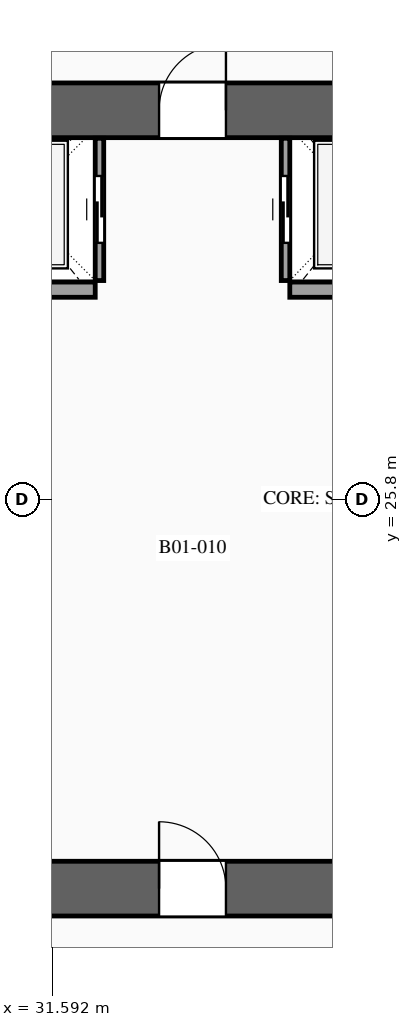
"""IFC4 building model, lengths in metres.
Left out: names, types, materials, properties, quantities, classifications, styles, units other than length and angle.
Written with IfcOpenShell. Run it as: python <this file> out.ifc"""

import sys

from ifc_helpers import new_model, si_unit, direction, frame, frame_2d, origin, place, context, subcontext, project, spatial, rectangle, extrude, source, transform, mapped, element, fill, save


model = new_model("IFC4")
c1 = context("Model", 3, precision=1e-05, world=origin(), true_north=direction((0.0, 1.0)))
c2 = subcontext(c1, "Body", "Model", "MODEL_VIEW")
j1 = project(units=[si_unit("LENGTHUNIT", "METRE"), si_unit("PLANEANGLEUNIT", "RADIAN")], contexts=[c1])
p1 = place(None, origin())
s1 = spatial("IfcSite", under=j1, at=p1, CompositionType="ELEMENT")
p2 = place(p1, origin())
s2 = spatial("IfcBuilding", under=s1, at=p2, CompositionType="ELEMENT")
p3 = place(p2, frame((0.0, 0.0, -4.5)))
s3 = spatial("IfcBuildingStorey", under=s2, at=p3, CompositionType="ELEMENT", Elevation=-4.5)
p4 = place(p3, frame((23.35, 19.4, 0.0), z_axis=(0.0, 0.0, 1.0), x_axis=(1.0, 0.0, 0.0)))
e1 = element("IfcWall", 1, at=p4, inside=s3, PredefinedType="SHEAR", context=c2, shape_type="SweptSolid", body=[
    extrude(rectangle(XDim=27.3, YDim=0.9, at=frame_2d((13.65, 0.0))), origin(), (0.0, 0.0, 1.0), 4.5),
])
p5 = place(p4, frame((2.1, 0.0, 0.0)))
e2 = element("IfcOpeningElement", 2, at=p5, cuts=e1, PredefinedType="OPENING", context=c2, shape_type="SweptSolid", body=[
    extrude(rectangle(XDim=1.1, YDim=2.2, at=frame_2d((0.55, 1.1))), frame((0.0, 0.465, 0.0), z_axis=(0.0, -1.0, 0.0), x_axis=(1.0, 0.0, 0.0)), (0.0, 0.0, 1.0), 0.93),
])
p6 = place(p4, frame((10.0, 0.0, 0.0)))
e3 = element("IfcOpeningElement", 3, at=p6, cuts=e1, PredefinedType="OPENING", context=c2, shape_type="SweptSolid", body=[
    extrude(rectangle(XDim=1.1, YDim=2.2, at=frame_2d((0.55, 1.1))), frame((0.0, 0.465, 0.0), z_axis=(0.0, -1.0, 0.0), x_axis=(1.0, 0.0, 0.0)), (0.0, 0.0, 1.0), 0.93),
])
p7 = place(p4, frame((23.2, 0.0, 0.0)))
e4 = element("IfcOpeningElement", 4, at=p7, cuts=e1, PredefinedType="OPENING", context=c2, shape_type="SweptSolid", body=[
    extrude(rectangle(XDim=1.1, YDim=2.2, at=frame_2d((0.55, 1.1))), frame((0.0, 0.465, 0.0), z_axis=(0.0, -1.0, 0.0), x_axis=(1.0, 0.0, 0.0)), (0.0, 0.0, 1.0), 0.93),
])
p8 = place(p4, frame((19.82, 0.0, 0.0)))
e5 = element("IfcOpeningElement", 5, at=p8, cuts=e1, PredefinedType="OPENING", context=c2, shape_type="SweptSolid", body=[
    extrude(rectangle(XDim=0.9, YDim=2.15, at=frame_2d((0.45, 1.075))), frame((0.0, 0.465, 0.0), z_axis=(0.0, -1.0, 0.0), x_axis=(1.0, 0.0, 0.0)), (0.0, 0.0, 1.0), 0.93),
])
p9 = place(p4, frame((18.38, 0.0, 0.0)))
e6 = element("IfcOpeningElement", 6, at=p9, cuts=e1, PredefinedType="OPENING", context=c2, shape_type="SweptSolid", body=[
    extrude(rectangle(XDim=0.9, YDim=2.15, at=frame_2d((0.45, 1.075))), frame((0.0, 0.465, 0.0), z_axis=(0.0, -1.0, 0.0), x_axis=(1.0, 0.0, 0.0)), (0.0, 0.0, 1.0), 0.93),
])
p10 = place(p3, frame((23.35, 32.2, 0.0), z_axis=(0.0, 0.0, 1.0), x_axis=(1.0, 0.0, 0.0)))
e7 = element("IfcWall", 7, at=p10, inside=s3, PredefinedType="SHEAR", context=c2, shape_type="SweptSolid", body=[
    extrude(rectangle(XDim=27.3, YDim=0.9, at=frame_2d((13.65, 0.0))), origin(), (0.0, 0.0, 1.0), 4.5),
])
p11 = place(p10, frame((4.72, 0.0, 0.0)))
e8 = element("IfcOpeningElement", 8, at=p11, cuts=e7, PredefinedType="OPENING", context=c2, shape_type="SweptSolid", body=[
    extrude(rectangle(XDim=0.9, YDim=2.15, at=frame_2d((0.45, 1.075))), frame((0.0, 0.465, 0.0), z_axis=(0.0, -1.0, 0.0), x_axis=(1.0, 0.0, 0.0)), (0.0, 0.0, 1.0), 0.93),
])
p12 = place(p10, frame((10.0, 0.0, 0.0)))
e9 = element("IfcOpeningElement", 9, at=p12, cuts=e7, PredefinedType="OPENING", context=c2, shape_type="SweptSolid", body=[
    extrude(rectangle(XDim=1.1, YDim=2.2, at=frame_2d((0.55, 1.1))), frame((0.0, 0.465, 0.0), z_axis=(0.0, -1.0, 0.0), x_axis=(1.0, 0.0, 0.0)), (0.0, 0.0, 1.0), 0.93),
])
p13 = place(p10, frame((15.85, 0.0, 0.0)))
e10 = element("IfcOpeningElement", 10, at=p13, cuts=e7, PredefinedType="OPENING", context=c2, shape_type="SweptSolid", body=[
    extrude(rectangle(XDim=1.1, YDim=2.2, at=frame_2d((0.55, 1.1))), frame((0.0, 0.465, 0.0), z_axis=(0.0, -1.0, 0.0), x_axis=(1.0, 0.0, 0.0)), (0.0, 0.0, 1.0), 0.93),
])
p14 = place(p10, frame((19.05, 0.0, 0.0)))
e11 = element("IfcOpeningElement", 11, at=p14, cuts=e7, PredefinedType="OPENING", context=c2, shape_type="SweptSolid", body=[
    extrude(rectangle(XDim=0.9, YDim=2.15, at=frame_2d((0.45, 1.075))), frame((0.0, 0.465, 0.0), z_axis=(0.0, -1.0, 0.0), x_axis=(1.0, 0.0, 0.0)), (0.0, 0.0, 1.0), 0.93),
])
p15 = place(p3, frame((32.37, 29.4, 0.0), z_axis=(0.0, 0.0, 1.0), x_axis=(0.0, 1.0, 0.0)))
e12 = element("IfcWall", 12, at=p15, inside=s3, PredefinedType="SOLIDWALL", context=c2, shape_type="SweptSolid", body=[
    extrude(rectangle(XDim=2.34, YDim=0.14, at=frame_2d((1.17, 0.0))), origin(), (0.0, 0.0, 1.0), 4.2),
])
p16 = place(p15, frame((0.62, 0.0, 0.0)))
e13 = element("IfcOpeningElement", 13, at=p16, cuts=e12, PredefinedType="OPENING", context=c2, shape_type="SweptSolid", body=[
    extrude(rectangle(XDim=1.1, YDim=2.2, at=frame_2d((0.55, 1.1))), frame((0.0, 0.085, 0.0), z_axis=(0.0, -1.0, 0.0), x_axis=(1.0, 0.0, 0.0)), (0.0, 0.0, 1.0), 0.17),
])
m1 = source(origin(), c2, "Body", "SweptSolid", [
    extrude(rectangle(XDim=2.5, YDim=0.25, at=frame_2d((1.25, 0.0))), origin(), (0.0, 0.0, 1.0), 4.2),
])
p17 = place(p3, frame((29.8, 29.25, 0.0), z_axis=(0.0, 0.0, 1.0), x_axis=(1.0, 0.0, 0.0)))
e14 = element("IfcWall", 14, at=p17, inside=s3, PredefinedType="SOLIDWALL", context=c2, shape_type="MappedRepresentation", body=[
    mapped(m1, transform((0.0, 0.0, 0.0), scale=1.0)),
])
p18 = place(p3, frame((35.43, 29.4, 0.0), z_axis=(0.0, 0.0, 1.0), x_axis=(0.0, 1.0, 0.0)))
e15 = element("IfcWall", 15, at=p18, inside=s3, PredefinedType="SOLIDWALL", context=c2, shape_type="SweptSolid", body=[
    extrude(rectangle(XDim=2.34, YDim=0.14, at=frame_2d((1.17, 0.0))), origin(), (0.0, 0.0, 1.0), 4.2),
])
p19 = place(p18, frame((0.62, 0.0, 0.0)))
e16 = element("IfcOpeningElement", 16, at=p19, cuts=e15, PredefinedType="OPENING", context=c2, shape_type="SweptSolid", body=[
    extrude(rectangle(XDim=1.1, YDim=2.2, at=frame_2d((0.55, 1.1))), frame((0.0, 0.085, 0.0), z_axis=(0.0, -1.0, 0.0), x_axis=(1.0, 0.0, 0.0)), (0.0, 0.0, 1.0), 0.17),
])
m2 = source(origin(), c2, "Body", "SweptSolid", [
    extrude(rectangle(XDim=2.4, YDim=0.25, at=frame_2d((1.2, 0.0))), origin(), (0.0, 0.0, 1.0), 4.2),
])
p20 = place(p3, frame((35.5, 29.25, 0.0), z_axis=(0.0, 0.0, 1.0), x_axis=(1.0, 0.0, 0.0)))
e17 = element("IfcWall", 17, at=p20, inside=s3, PredefinedType="SOLIDWALL", context=c2, shape_type="MappedRepresentation", body=[
    mapped(m2, transform((0.0, 0.0, 0.0), scale=1.0)),
])
m3 = source(origin(), c2, "Body", "SweptSolid", [
    extrude(rectangle(XDim=1.1, YDim=2.2, at=frame_2d((0.55, 1.1))), frame((0.0, 0.025, 0.0), z_axis=(0.0, -1.0, 0.0), x_axis=(1.0, 0.0, 0.0)), (0.0, 0.0, 1.0), 0.05),
])
p21 = place(p16, origin())
e18 = element("IfcDoor", 18, at=p21, inside=s3, OperationType="SLIDING_TO_LEFT", PredefinedType="DOOR", context=c2, shape_type="MappedRepresentation", body=[
    mapped(m3, transform((0.0, 0.0, 0.0), scale=1.0)),
])
fill(e13, e18)
p22 = place(p19, origin())
e19 = element("IfcDoor", 19, at=p22, inside=s3, OperationType="SLIDING_TO_RIGHT", PredefinedType="DOOR", context=c2, shape_type="MappedRepresentation", body=[
    mapped(m3, transform((0.0, 0.0, 0.0), scale=1.0)),
])
fill(e16, e19)
m4 = source(origin(), c2, "Body", "SweptSolid", [
    extrude(rectangle(XDim=1.1, YDim=2.2, at=frame_2d((0.55, 1.1))), frame((0.0, 0.025, 0.0), z_axis=(0.0, -1.0, 0.0), x_axis=(1.0, 0.0, 0.0)), (0.0, 0.0, 1.0), 0.05),
])
p23 = place(p6, origin())
e20 = element("IfcDoor", 20, at=p23, inside=s3, OperationType="SINGLE_SWING_LEFT", PredefinedType="DOOR", context=c2, shape_type="MappedRepresentation", body=[
    mapped(m4, transform((0.0, 0.0, 0.0), scale=1.0)),
])
fill(e3, e20)
p24 = place(p12, origin())
e21 = element("IfcDoor", 21, at=p24, inside=s3, OperationType="SINGLE_SWING_RIGHT", PredefinedType="DOOR", context=c2, shape_type="MappedRepresentation", body=[
    mapped(m4, transform((0.0, 0.0, 0.0), scale=1.0)),
])
fill(e9, e21)
save(model, sys.argv[1])
